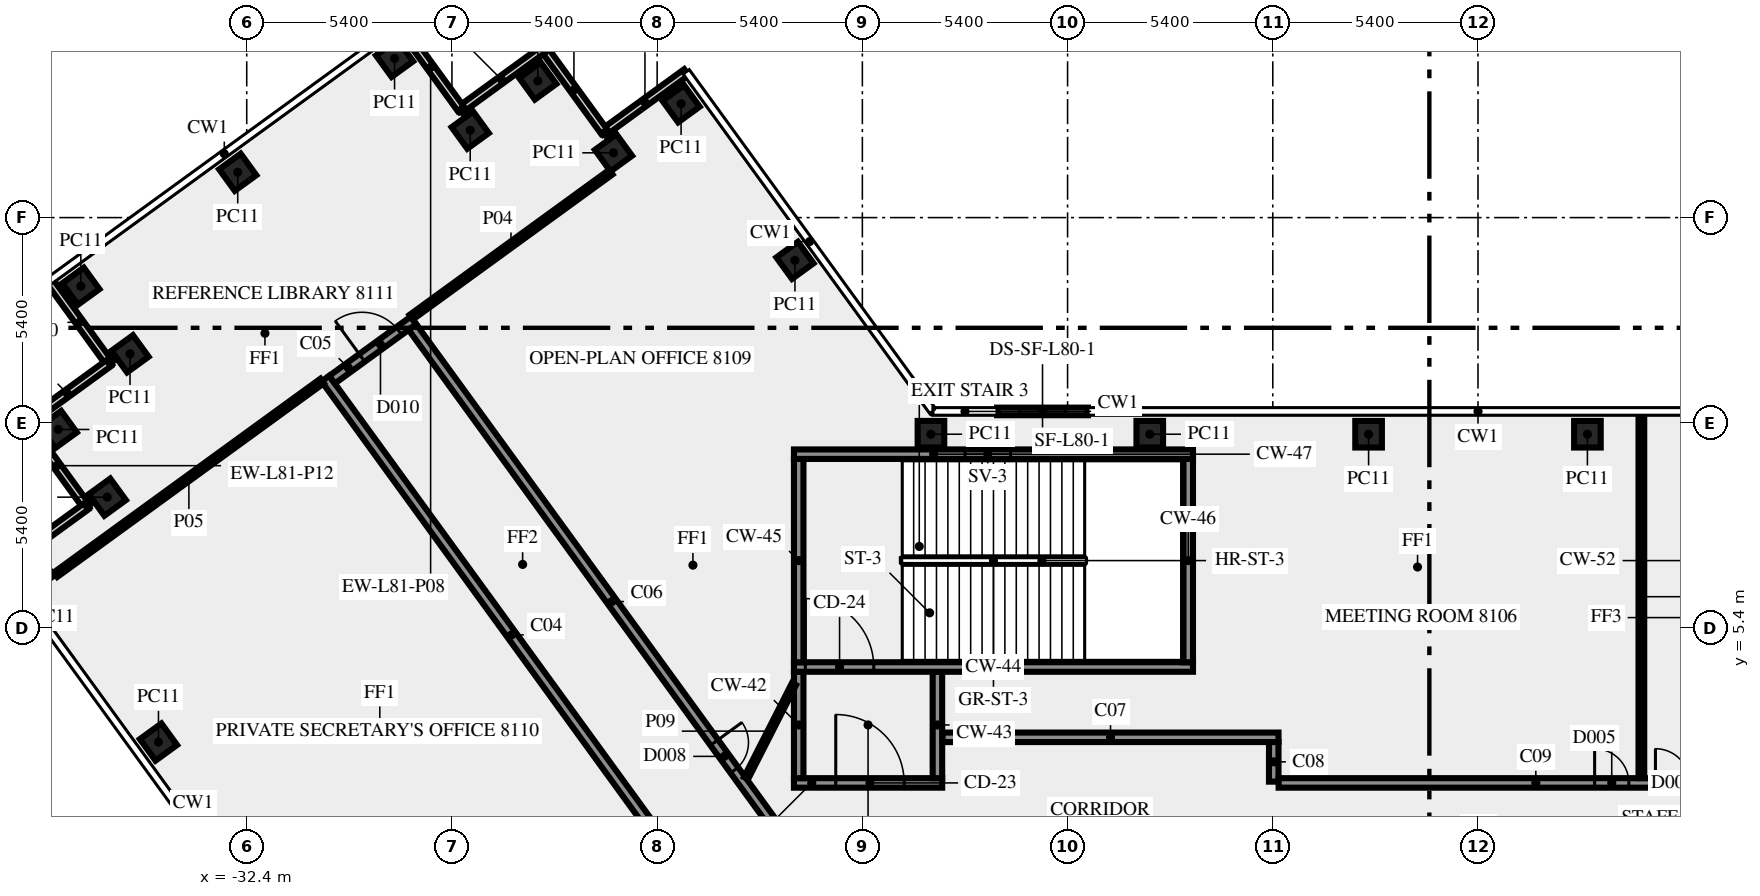
"""IFC4 building model, lengths in metres.
Left out: names, types, materials, properties, quantities, classifications, styles, units other than length and angle.
Written with IfcOpenShell. Run it as: python <this file> out.ifc"""

import sys

from ifc_helpers import new_model, si_unit, direction, frame, frame_2d, origin, origin_2d, place, context, subcontext, project, spatial, rectangle, extrude, element, fill, save


model = new_model("IFC4")
c1 = context("Model", 3, precision=1e-05, world=origin(), true_north=direction((0.0, 1.0)))
c2 = subcontext(c1, "Body", "Model", "MODEL_VIEW")
j1 = project(units=[si_unit("LENGTHUNIT", "METRE"), si_unit("PLANEANGLEUNIT", "RADIAN")], contexts=[c1])
p1 = place(None, origin())
s1 = spatial("IfcSite", under=j1, at=p1, CompositionType="ELEMENT")
p2 = place(p1, origin())
s2 = spatial("IfcBuilding", under=s1, at=p2, CompositionType="ELEMENT")
p3 = place(p2, frame((0.0, 0.0, 347.0)))
s3 = spatial("IfcBuildingStorey", under=s2, at=p3, CompositionType="ELEMENT", Elevation=347.0)
for number, where, z_axis, x_axis in (
    (1, (-17.974, 15.075, 0.0), (0.0, 0.0, 1.0), (-0.588, 0.809, 0.0)),
    (2, (-20.97, 19.195, 0.0), (0.0, 0.0, 1.0), (-0.588, 0.809, 0.0)),
    (3, (-22.749, 17.904, 0.0), (0.0, 0.0, 1.0), (-0.588, 0.809, 0.0)),
    (4, (-24.74, 19.795, 0.0), (0.0, 0.0, 1.0), (-0.588, 0.809, 0.0)),
    (5, (-26.519, 18.5, 0.0), (0.0, 0.0, 1.0), (-0.588, 0.809, 0.0)),
    (6, (-28.51, 20.39, 0.0), (0.0, 0.0, 1.0), (-0.809, -0.588, 0.0)),
    (7, (-32.637, 17.393, 0.0), (0.0, 0.0, 1.0), (-0.809, -0.588, 0.0)),
    (8, (-36.765, 14.395, 0.0), (0.0, 0.0, 1.0), (0.588, -0.809, 0.0)),
    (9, (-35.471, 12.616, 0.0), (0.0, 0.0, 1.0), (-0.809, -0.588, 0.0)),
    (10, (-37.36, 10.625, 0.0), (0.0, 0.0, 1.0), (0.588, -0.809, 0.0)),
    (11, (-36.068, 8.844, 0.0), (0.0, 0.0, 1.0), (0.588, -0.809, 0.0)),
    (12, (-37.96, 6.855, 0.0), (0.0, 0.0, 1.0), (0.588, -0.809, 0.0)),
    (13, (-34.722, 2.4, 0.0), (0.0, 0.0, 1.0), (0.588, -0.809, 0.0)),
    (14, (2.879, 10.5, 0.0), (0.0, 0.0, 1.0), (-1.0, 0.0, 0.0)),
    (15, (-2.879, 10.5, 0.0), (0.0, 0.0, 1.0), (-1.0, 0.0, 0.0)),
    (16, (-8.637, 10.5, 0.0), (0.0, 0.0, 1.0), (-1.0, 0.0, 0.0)),
    (17, (-14.395, 10.5, 0.0), (0.0, 0.0, 1.0), (-1.0, 0.0, 0.0)),
):
    element("IfcColumn", number, at=place(p3, frame(where, z_axis=z_axis, x_axis=x_axis)), inside=s3, PredefinedType="COLUMN", context=c2, shape_type="SweptSolid", body=[
        extrude(rectangle(XDim=0.7, YDim=0.7, at=origin_2d()), origin(), (0.0, 0.0, 1.0), 3.65),
    ])
for number, where, z_axis, x_axis in (
    (18, (-20.829, 20.025, 0.0), (0.0, 0.0, 1.0), (-0.809, -0.588, 0.0)),
    (19, (-22.996, 18.466, 0.0), (0.0, 0.0, 1.0), (-0.588, 0.809, 0.0)),
):
    element("IfcWall", number, at=place(p3, frame(where, z_axis=z_axis, x_axis=x_axis)), inside=s3, PredefinedType="SOLIDWALL", context=c2, shape_type="SweptSolid", body=[
        extrude(rectangle(XDim=2.7, YDim=0.2, at=frame_2d((1.35, 0.0))), origin(), (0.0, 0.0, 1.0), 3.65),
    ])
for number, where, z_axis, x_axis in (
    (20, (-24.6, 20.623, 0.0), (0.0, 0.0, 1.0), (-0.809, -0.588, 0.0)),
    (21, (-26.768, 19.063, 0.0), (0.0, 0.0, 1.0), (-0.588, 0.809, 0.0)),
):
    element("IfcWall", number, at=place(p3, frame(where, z_axis=z_axis, x_axis=x_axis)), inside=s3, PredefinedType="SOLIDWALL", context=c2, shape_type="SweptSolid", body=[
        extrude(rectangle(XDim=2.7, YDim=0.2, at=frame_2d((1.35, 0.0))), origin(), (0.0, 0.0, 1.0), 3.65),
    ])
for number, where, z_axis, x_axis in (
    (22, (-37.592, 14.536, 0.0), (0.0, 0.0, 1.0), (0.588, -0.809, 0.0)),
    (23, (-36.032, 12.369, 0.0), (0.0, 0.0, 1.0), (-0.809, -0.588, 0.0)),
    (24, (-38.189, 10.765, 0.0), (0.0, 0.0, 1.0), (0.588, -0.809, 0.0)),
    (25, (-36.629, 8.597, 0.0), (0.0, 0.0, 1.0), (-0.809, -0.588, 0.0)),
):
    element("IfcWall", number, at=place(p3, frame(where, z_axis=z_axis, x_axis=x_axis)), inside=s3, PredefinedType="SOLIDWALL", context=c2, shape_type="SweptSolid", body=[
        extrude(rectangle(XDim=2.7, YDim=0.2, at=frame_2d((1.35, 0.0))), origin(), (0.0, 0.0, 1.0), 3.65),
    ])
p4 = place(p3, frame((-10.263, 11.1, 0.0), z_axis=(0.0, 0.0, 1.0), x_axis=(-1.0, 0.0, 0.0)))
e26 = element("IfcWall", 26, at=p4, inside=s3, PredefinedType="SOLIDWALL", context=c2, shape_type="SweptSolid", body=[
    extrude(rectangle(XDim=2.392, YDim=0.2, at=frame_2d((1.196, 0.0))), origin(), (0.0, 0.0, 1.0), 3.65),
])
p5 = place(p4, frame((0.596, 0.0, 1.0)))
e27 = element("IfcOpeningElement", 27, at=p5, cuts=e26, PredefinedType="OPENING", context=c2, shape_type="SweptSolid", body=[
    extrude(rectangle(XDim=1.2, YDim=1.2, at=frame_2d((0.6, 0.6))), frame((0.0, 0.11, 0.0), z_axis=(0.0, -1.0, 0.0), x_axis=(1.0, 0.0, 0.0)), (0.0, 0.0, 1.0), 0.22),
])
p6 = place(p3, frame((-18.0, 1.325, 0.0), z_axis=(0.0, 0.0, 1.0), x_axis=(1.0, 0.0, 0.0)))
e28 = element("IfcWall", 28, at=p6, inside=s3, PredefinedType="SHEAR", context=c2, shape_type="SweptSolid", body=[
    extrude(rectangle(XDim=3.9, YDim=0.25, at=frame_2d((1.95, 0.0))), origin(), (0.0, 0.0, 1.0), 3.65),
])
p7 = place(p6, frame((1.1, 0.0, 0.0)))
e29 = element("IfcOpeningElement", 29, at=p7, cuts=e28, PredefinedType="OPENING", context=c2, shape_type="SweptSolid", body=[
    extrude(rectangle(XDim=1.8, YDim=2.1, at=frame_2d((0.9, 1.05))), frame((0.0, 0.135, 0.0), z_axis=(0.0, -1.0, 0.0), x_axis=(1.0, 0.0, 0.0)), (0.0, 0.0, 1.0), 0.27),
])
for number, where, z_axis, x_axis in (
    (30, (-17.875, 1.45, 0.0), (0.0, 0.0, 1.0), (0.0, 1.0, 0.0)),
    (31, (-14.225, 1.45, 0.0), (0.0, 0.0, 1.0), (0.0, 1.0, 0.0)),
):
    element("IfcWall", number, at=place(p3, frame(where, z_axis=z_axis, x_axis=x_axis)), inside=s3, PredefinedType="SHEAR", context=c2, shape_type="SweptSolid", body=[
        extrude(rectangle(XDim=2.8, YDim=0.25, at=frame_2d((1.4, 0.0))), origin(), (0.0, 0.0, 1.0), 3.65),
    ])
p8 = place(p3, frame((-18.0, 4.375, 0.0), z_axis=(0.0, 0.0, 1.0), x_axis=(1.0, 0.0, 0.0)))
e32 = element("IfcWall", 32, at=p8, inside=s3, PredefinedType="SHEAR", context=c2, shape_type="SweptSolid", body=[
    extrude(rectangle(XDim=10.5, YDim=0.25, at=frame_2d((5.25, 0.0))), origin(), (0.0, 0.0, 1.0), 3.65),
])
p9 = place(p8, frame((0.3, 0.0, 0.0)))
e33 = element("IfcOpeningElement", 33, at=p9, cuts=e32, PredefinedType="OPENING", context=c2, shape_type="SweptSolid", body=[
    extrude(rectangle(XDim=1.8, YDim=2.1, at=frame_2d((0.9, 1.05))), frame((0.0, 0.135, 0.0), z_axis=(0.0, -1.0, 0.0), x_axis=(1.0, 0.0, 0.0)), (0.0, 0.0, 1.0), 0.27),
])
for number, where, z_axis, x_axis in (
    (34, (-17.875, 4.5, 0.0), (0.0, 0.0, 1.0), (0.0, 1.0, 0.0)),
    (35, (-7.625, 4.5, 0.0), (0.0, 0.0, 1.0), (0.0, 1.0, 0.0)),
):
    element("IfcWall", number, at=place(p3, frame(where, z_axis=z_axis, x_axis=x_axis)), inside=s3, PredefinedType="SHEAR", context=c2, shape_type="SweptSolid", body=[
        extrude(rectangle(XDim=5.35, YDim=0.25, at=frame_2d((2.675, 0.0))), origin(), (0.0, 0.0, 1.0), 3.65),
    ])
p10 = place(p3, frame((-18.0, 9.975, 0.0), z_axis=(0.0, 0.0, 1.0), x_axis=(1.0, 0.0, 0.0)))
e36 = element("IfcWall", 36, at=p10, inside=s3, PredefinedType="SHEAR", context=c2, shape_type="SweptSolid", body=[
    extrude(rectangle(XDim=10.5, YDim=0.25, at=frame_2d((5.25, 0.0))), origin(), (0.0, 0.0, 1.0), 3.65),
])
p11 = place(p10, frame((4.5, 0.0, 1.0)))
e37 = element("IfcOpeningElement", 37, at=p11, cuts=e36, PredefinedType="OPENING", context=c2, shape_type="SweptSolid", body=[
    extrude(rectangle(XDim=1.2, YDim=1.2, at=frame_2d((0.6, 0.6))), frame((0.0, 0.135, 0.0), z_axis=(0.0, -1.0, 0.0), x_axis=(1.0, 0.0, 0.0)), (0.0, 0.0, 1.0), 0.27),
])
p12 = place(p3, frame((-20.531, -1.523, 0.0), z_axis=(0.0, 0.0, 1.0), x_axis=(-0.587785867777, 0.809016547199, 0.0)))
e38 = element("IfcWall", 38, at=p12, inside=s3, PredefinedType="SOLIDWALL", context=c2, shape_type="SweptSolid", body=[
    extrude(rectangle(XDim=16.67, YDim=0.25, at=frame_2d((8.335, 0.0))), origin(), (0.0, 0.0, 1.0), 3.65),
])
p13 = place(p12, frame((0.533, 0.0, 0.0)))
e39 = element("IfcOpeningElement", 39, at=p13, cuts=e38, PredefinedType="OPENING", context=c2, shape_type="SweptSolid", body=[
    extrude(rectangle(XDim=0.9, YDim=2.1, at=frame_2d((0.45, 1.05))), frame((0.0, 0.135, 0.0), z_axis=(0.0, -1.0, 0.0), x_axis=(1.0, 0.0, 0.0)), (0.0, 0.0, 1.0), 0.27),
])
p14 = place(p3, frame((-30.155, 11.936, 0.0), z_axis=(0.0, 0.0, 1.0), x_axis=(0.809038743598, 0.587755315891, 0.0)))
e40 = element("IfcWall", 40, at=p14, inside=s3, PredefinedType="SOLIDWALL", context=c2, shape_type="SweptSolid", body=[
    extrude(rectangle(XDim=2.65, YDim=0.25, at=frame_2d((1.325, 0.0))), origin(), (0.0, 0.0, 1.0), 3.65),
])
p15 = place(p14, frame((0.976, 0.0, 0.0)))
e41 = element("IfcOpeningElement", 41, at=p15, cuts=e40, PredefinedType="OPENING", context=c2, shape_type="SweptSolid", body=[
    extrude(rectangle(XDim=1.2, YDim=2.1, at=frame_2d((0.6, 1.05))), frame((0.0, 0.135, 0.0), z_axis=(0.0, -1.0, 0.0), x_axis=(1.0, 0.0, 0.0)), (0.0, 0.0, 1.0), 0.27),
])
p16 = place(p3, frame((-28.039, 13.319, 0.0), z_axis=(0.0, 0.0, 1.0), x_axis=(0.587791911753, -0.809012155952, 0.0)))
e42 = element("IfcWall", 42, at=p16, inside=s3, PredefinedType="SOLIDWALL", context=c2, shape_type="SweptSolid", body=[
    extrude(rectangle(XDim=17.853, YDim=0.25, at=frame_2d((8.927, 0.0))), origin(), (0.0, 0.0, 1.0), 3.65),
])
p17 = place(p16, frame((13.512, 0.0, 0.0)))
e43 = element("IfcOpeningElement", 43, at=p17, cuts=e42, PredefinedType="OPENING", context=c2, shape_type="SweptSolid", body=[
    extrude(rectangle(XDim=0.9, YDim=2.1, at=frame_2d((0.45, 1.05))), frame((0.0, 0.135, 0.0), z_axis=(0.0, -1.0, 0.0), x_axis=(1.0, 0.0, 0.0)), (0.0, 0.0, 1.0), 0.27),
])
p18 = place(p3, frame((-14.09, 2.525, 0.0), z_axis=(0.0, 0.0, 1.0), x_axis=(1.0, 0.0, 0.0)))
e44 = element("IfcWall", 44, at=p18, inside=s3, PredefinedType="SOLIDWALL", context=c2, shape_type="SweptSolid", body=[
    extrude(rectangle(XDim=8.84, YDim=0.25, at=frame_2d((4.42, 0.0))), origin(), (0.0, 0.0, 1.0), 3.65),
])
p19 = place(p3, frame((-5.375, 2.4, 0.0), z_axis=(0.0, 0.0, 1.0), x_axis=(0.0, -1.0, 0.0)))
e45 = element("IfcWall", 45, at=p19, inside=s3, PredefinedType="SOLIDWALL", context=c2, shape_type="SweptSolid", body=[
    extrude(rectangle(XDim=1.041, YDim=0.25, at=frame_2d((0.521, 0.0))), origin(), (0.0, 0.0, 1.0), 3.65),
])
p20 = place(p3, frame((-5.246, 1.325, 0.0), z_axis=(0.0, 0.0, 1.0), x_axis=(1.0, 0.0, 0.0)))
e46 = element("IfcWall", 46, at=p20, inside=s3, PredefinedType="SOLIDWALL", context=c2, shape_type="SweptSolid", body=[
    extrude(rectangle(XDim=19.336, YDim=0.25, at=frame_2d((9.668, 0.0))), origin(), (0.0, 0.0, 1.0), 3.65),
])
p21 = place(p20, frame((8.315, 0.0, 0.0)))
e47 = element("IfcOpeningElement", 47, at=p21, cuts=e46, PredefinedType="OPENING", context=c2, shape_type="SweptSolid", body=[
    extrude(rectangle(XDim=0.9, YDim=2.1, at=frame_2d((0.45, 1.05))), frame((0.0, 0.135, 0.0), z_axis=(0.0, -1.0, 0.0), x_axis=(1.0, 0.0, 0.0)), (0.0, 0.0, 1.0), 0.27),
])
p22 = place(p20, frame((9.915, 0.0, 0.0)))
e48 = element("IfcOpeningElement", 48, at=p22, cuts=e46, PredefinedType="OPENING", context=c2, shape_type="SweptSolid", body=[
    extrude(rectangle(XDim=0.9, YDim=2.1, at=frame_2d((0.45, 1.05))), frame((0.0, 0.135, 0.0), z_axis=(0.0, -1.0, 0.0), x_axis=(1.0, 0.0, 0.0)), (0.0, 0.0, 1.0), 0.27),
])
p23 = place(p20, frame((12.794, 0.0, 0.0)))
e49 = element("IfcOpeningElement", 49, at=p23, cuts=e46, PredefinedType="OPENING", context=c2, shape_type="SweptSolid", body=[
    extrude(rectangle(XDim=0.9, YDim=2.1, at=frame_2d((0.45, 1.05))), frame((0.0, 0.135, 0.0), z_axis=(0.0, -1.0, 0.0), x_axis=(1.0, 0.0, 0.0)), (0.0, 0.0, 1.0), 0.27),
])
p24 = place(p3, frame((-22.818, 17.396, 0.0), z_axis=(0.0, 0.0, 1.0), x_axis=(-0.809000932727, -0.587807358619, 0.0)))
e50 = element("IfcWall", 50, at=p24, inside=s3, PredefinedType="PARTITIONING", context=c2, shape_type="SweptSolid", body=[
    extrude(rectangle(XDim=6.496, YDim=0.15, at=frame_2d((3.248, 0.0))), origin(), (0.0, 0.0, 1.0), 3.65),
])
p25 = place(p3, frame((-37.429, 6.805, 0.0), z_axis=(0.0, 0.0, 1.0), x_axis=(0.809020922653, 0.587779845444, 0.0)))
e51 = element("IfcWall", 51, at=p25, inside=s3, PredefinedType="PARTITIONING", context=c2, shape_type="SweptSolid", body=[
    extrude(rectangle(XDim=8.67, YDim=0.15, at=frame_2d((4.335, 0.0))), origin(), (0.0, 0.0, 1.0), 3.65),
])
p26 = place(p3, frame((4.299, 1.45, 0.0), z_axis=(0.0, 0.0, 1.0), x_axis=(0.0, 1.0, 0.0)))
e52 = element("IfcWall", 52, at=p26, inside=s3, PredefinedType="PARTITIONING", context=c2, shape_type="SweptSolid", body=[
    extrude(rectangle(XDim=9.55, YDim=0.15, at=frame_2d((4.775, 0.0))), origin(), (0.0, 0.0, 1.0), 2.95),
])
p27 = place(p3, frame((-19.261, 1.45, 0.0), z_axis=(0.0, 0.0, 1.0), x_axis=(0.453950796792, 0.891026752736, 0.0)))
e53 = element("IfcWall", 53, at=p27, inside=s3, PredefinedType="PARTITIONING", context=c2, shape_type="SweptSolid", body=[
    extrude(rectangle(XDim=2.778, YDim=0.12, at=frame_2d((1.389, 0.0))), origin(), (0.0, 0.0, 1.0), 3.65),
])
p28 = place(p5, origin())
e54 = element("IfcWindow", 54, at=p28, inside=s3, PartitioningType="SINGLE_PANEL", PredefinedType="WINDOW", context=c2, shape_type="SweptSolid", body=[
    extrude(rectangle(XDim=1.2, YDim=1.2, at=frame_2d((0.6, 0.6))), frame((0.0, 0.03, 0.0), z_axis=(0.0, -1.0, 0.0), x_axis=(1.0, 0.0, 0.0)), (0.0, 0.0, 1.0), 0.06),
])
fill(e27, e54)
p29 = place(p7, origin())
e55 = element("IfcDoor", 55, at=p29, inside=s3, OperationType="DOUBLE_DOOR_SINGLE_SWING", PredefinedType="DOOR", context=c2, shape_type="SweptSolid", body=[
    extrude(rectangle(XDim=1.8, YDim=2.1, at=frame_2d((0.9, 1.05))), frame((0.0, 0.025, 0.0), z_axis=(0.0, -1.0, 0.0), x_axis=(1.0, 0.0, 0.0)), (0.0, 0.0, 1.0), 0.05),
])
fill(e29, e55)
p30 = place(p9, origin())
e56 = element("IfcDoor", 56, at=p30, inside=s3, OperationType="DOUBLE_DOOR_SINGLE_SWING", PredefinedType="DOOR", context=c2, shape_type="SweptSolid", body=[
    extrude(rectangle(XDim=1.8, YDim=2.1, at=frame_2d((0.9, 1.05))), frame((0.0, 0.025, 0.0), z_axis=(0.0, -1.0, 0.0), x_axis=(1.0, 0.0, 0.0)), (0.0, 0.0, 1.0), 0.05),
])
fill(e33, e56)
p31 = place(p11, origin())
e57 = element("IfcWindow", 57, at=p31, inside=s3, PartitioningType="SINGLE_PANEL", PredefinedType="WINDOW", context=c2, shape_type="SweptSolid", body=[
    extrude(rectangle(XDim=1.2, YDim=1.2, at=frame_2d((0.6, 0.6))), frame((0.0, 0.03, 0.0), z_axis=(0.0, -1.0, 0.0), x_axis=(1.0, 0.0, 0.0)), (0.0, 0.0, 1.0), 0.06),
])
fill(e37, e57)
p32 = place(p17, origin())
e58 = element("IfcDoor", 58, at=p32, inside=s3, OperationType="SINGLE_SWING_RIGHT", PredefinedType="DOOR", context=c2, shape_type="SweptSolid", body=[
    extrude(rectangle(XDim=0.9, YDim=2.1, at=frame_2d((0.45, 1.05))), frame((0.0, 0.025, 0.0), z_axis=(0.0, -1.0, 0.0), x_axis=(1.0, 0.0, 0.0)), (0.0, 0.0, 1.0), 0.05),
])
fill(e43, e58)
p33 = place(p15, origin())
e59 = element("IfcDoor", 59, at=p33, inside=s3, OperationType="SINGLE_SWING_RIGHT", PredefinedType="DOOR", context=c2, shape_type="SweptSolid", body=[
    extrude(rectangle(XDim=1.2, YDim=2.1, at=frame_2d((0.6, 1.05))), frame((0.0, 0.025, 0.0), z_axis=(0.0, -1.0, 0.0), x_axis=(1.0, 0.0, 0.0)), (0.0, 0.0, 1.0), 0.05),
])
fill(e41, e59)
p34 = place(p21, origin())
e60 = element("IfcDoor", 60, at=p34, inside=s3, OperationType="SINGLE_SWING_RIGHT", PredefinedType="DOOR", context=c2, shape_type="SweptSolid", body=[
    extrude(rectangle(XDim=0.9, YDim=2.1, at=frame_2d((0.45, 1.05))), frame((0.0, 0.025, 0.0), z_axis=(0.0, -1.0, 0.0), x_axis=(1.0, 0.0, 0.0)), (0.0, 0.0, 1.0), 0.05),
])
fill(e47, e60)
p35 = place(p22, origin())
e61 = element("IfcDoor", 61, at=p35, inside=s3, OperationType="SINGLE_SWING_LEFT", PredefinedType="DOOR", context=c2, shape_type="SweptSolid", body=[
    extrude(rectangle(XDim=0.9, YDim=2.1, at=frame_2d((0.45, 1.05))), frame((0.0, 0.025, 0.0), z_axis=(0.0, -1.0, 0.0), x_axis=(1.0, 0.0, 0.0)), (0.0, 0.0, 1.0), 0.05),
])
fill(e48, e61)
save(model, sys.argv[1])
